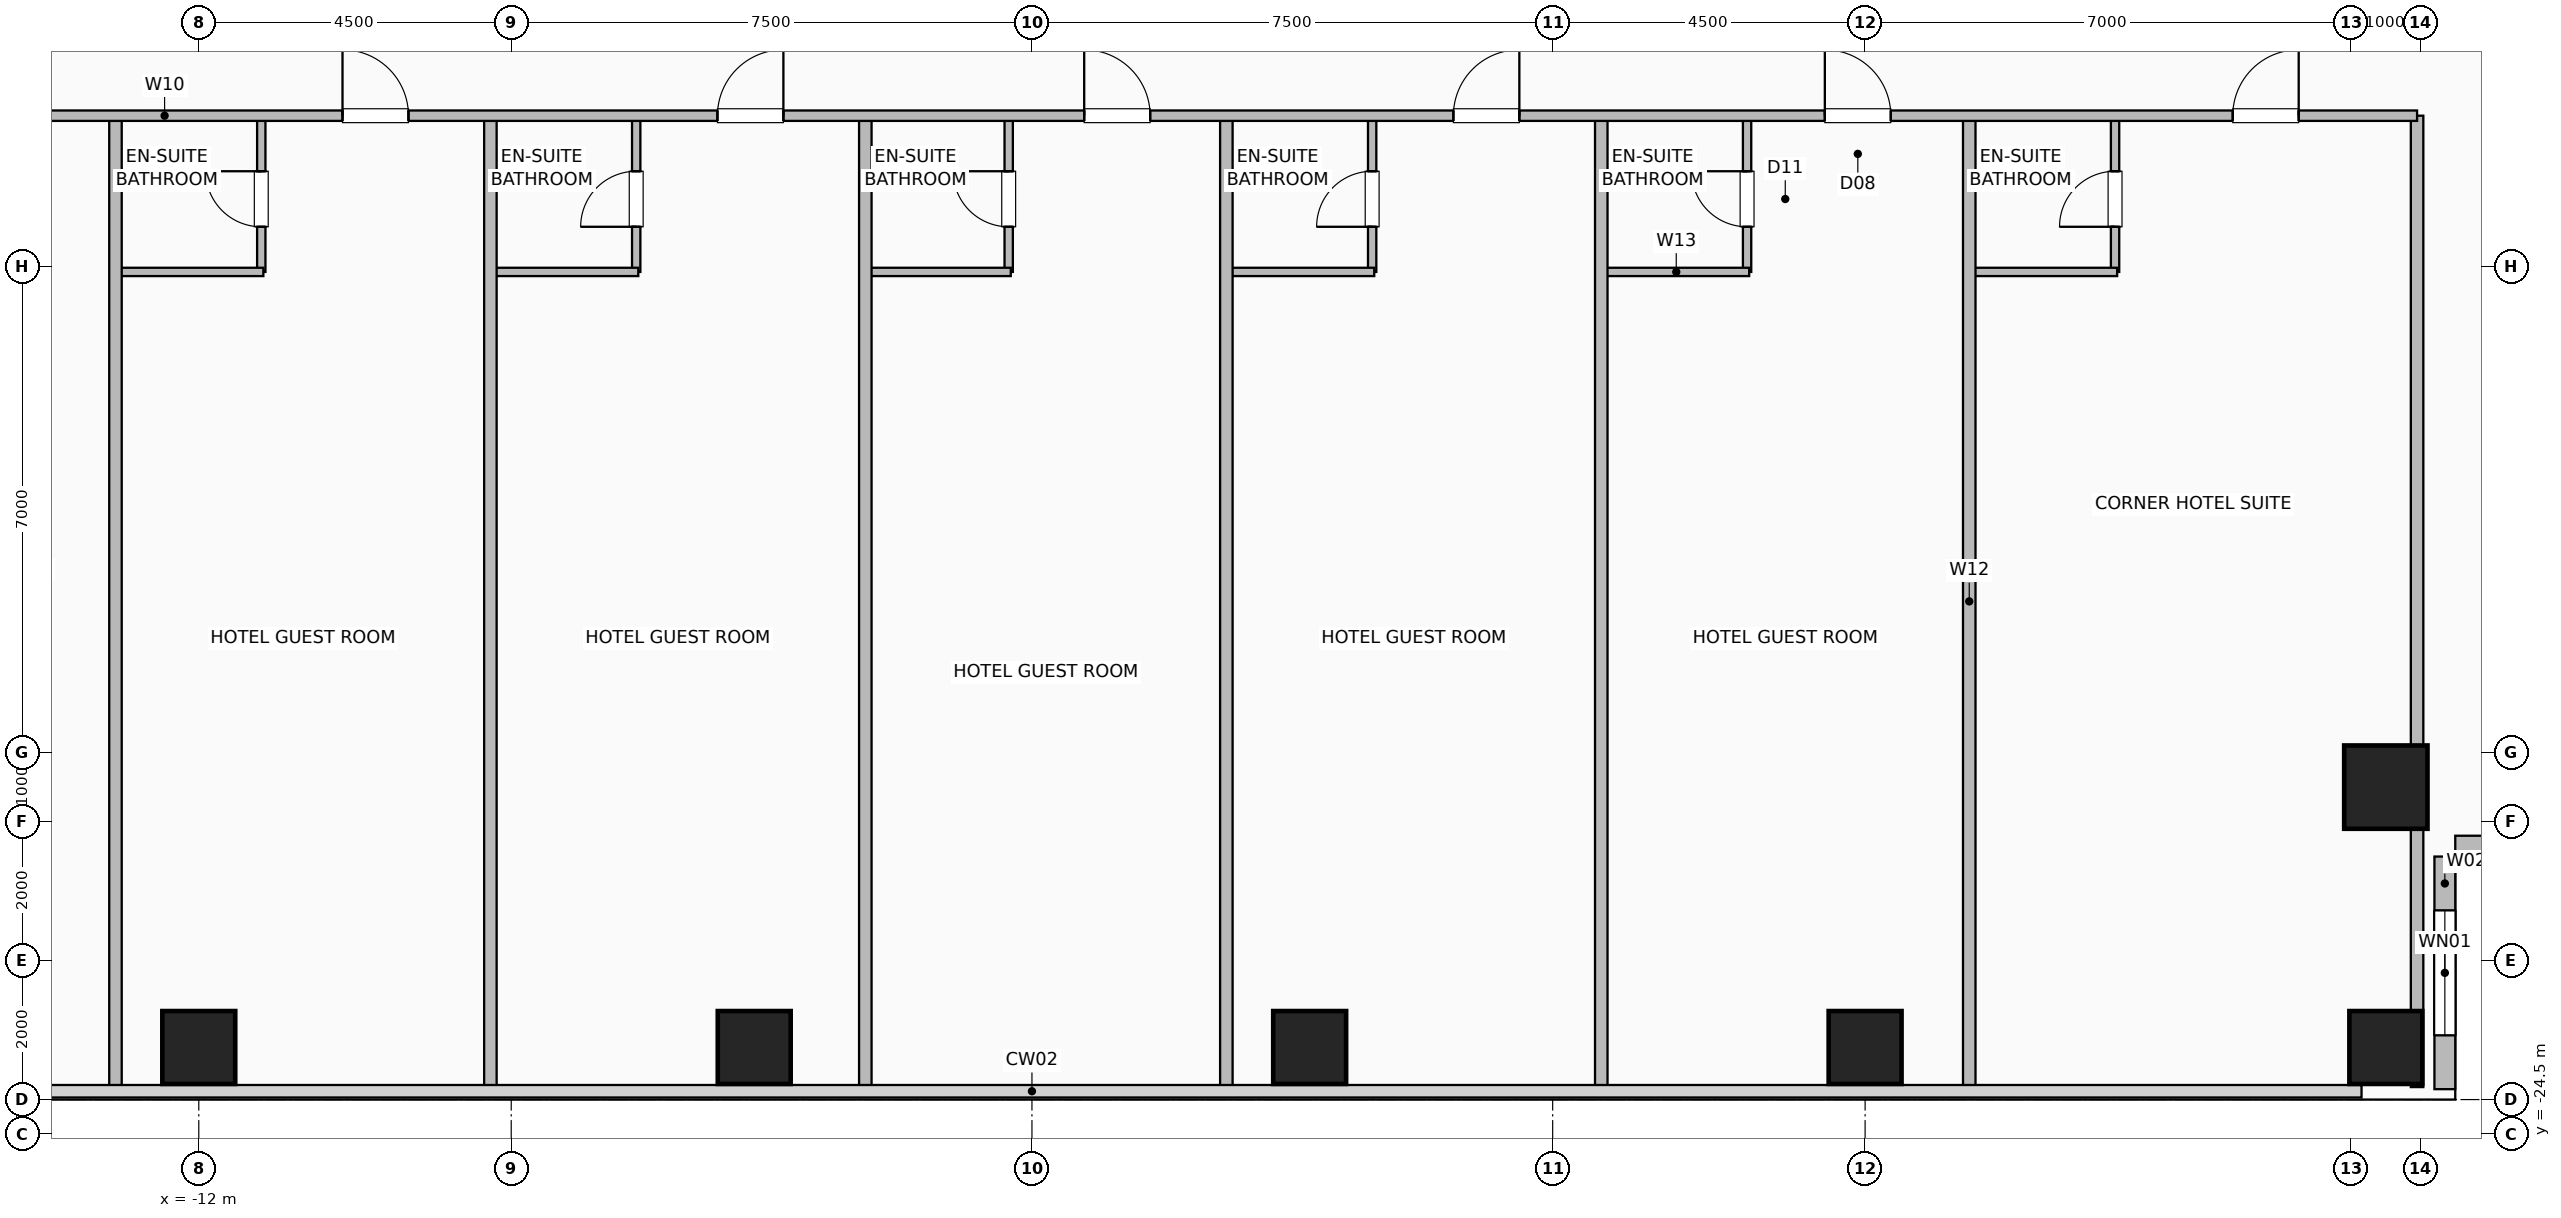
"""IFC4 building model, lengths in metres.
Left out: names, types, materials, properties, quantities, classifications, styles, units other than length and angle.
Written with IfcOpenShell. Run it as: python <this file> out.ifc"""

import sys

from ifc_helpers import new_model, si_unit, direction, frame, frame_2d, origin, origin_2d, place, context, subcontext, project, spatial, rectangle, hollow_rectangle, extrude, element, fill, save


model = new_model("IFC4")
c1 = context("Model", 3, precision=1e-05, world=origin(), true_north=direction((0.0, 1.0)))
c2 = subcontext(c1, "Body", "Model", "MODEL_VIEW")
j1 = project(units=[si_unit("LENGTHUNIT", "METRE"), si_unit("PLANEANGLEUNIT", "RADIAN")], contexts=[c1])
p1 = place(None, origin())
s1 = spatial("IfcSite", under=j1, at=p1, CompositionType="ELEMENT")
p2 = place(p1, origin())
s2 = spatial("IfcBuilding", under=s1, at=p2, CompositionType="ELEMENT")
p3 = place(p2, frame((0.0, 0.0, 30.5)))
s3 = spatial("IfcBuildingStorey", under=s2, at=p3, CompositionType="ELEMENT", Elevation=30.5)
for number, where, z_axis, x_axis in (
    (1, (-12.0, -23.25, 0.0), (0.0, 0.0, 1.0), (1.0, 0.0, 0.0)),
    (2, (-4.0, -23.25, 0.0), (0.0, 0.0, 1.0), (1.0, 0.0, 0.0)),
    (3, (4.0, -23.25, 0.0), (0.0, 0.0, 1.0), (1.0, 0.0, 0.0)),
    (4, (12.0, -23.25, 0.0), (0.0, 0.0, 1.0), (1.0, 0.0, 0.0)),
    (5, (19.5, -23.25, 0.0), (0.0, 0.0, 1.0), (1.0, 0.0, 0.0)),
):
    element("IfcColumn", number, at=place(p3, frame(where, z_axis=z_axis, x_axis=x_axis)), inside=s3, PredefinedType="COLUMN", context=c2, shape_type="SweptSolid", body=[
        extrude(hollow_rectangle(XDim=1.05, YDim=1.05, WallThickness=0.05, at=origin_2d()), origin(), (0.0, 0.0, 1.0), 3.5),
    ])
p4 = place(p3, frame((19.5, -19.5, 0.0), z_axis=(0.0, 0.0, 1.0), x_axis=(1.0, 0.0, 0.0)))
e6 = element("IfcColumn", 6, at=p4, inside=s3, PredefinedType="COLUMN", context=c2, shape_type="SweptSolid", body=[
    extrude(hollow_rectangle(XDim=1.2, YDim=1.2, WallThickness=0.055, at=origin_2d()), origin(), (0.0, 0.0, 1.0), 3.5),
])
p5 = place(p3, frame((20.35, -23.85, 0.0), z_axis=(0.0, 0.0, 1.0), x_axis=(0.0, 1.0, 0.0)))
e7 = element("IfcWall", 7, at=p5, inside=s3, PredefinedType="SOLIDWALL", context=c2, shape_type="SweptSolid", body=[
    extrude(rectangle(XDim=3.35, YDim=0.3, at=frame_2d((1.675, 0.0))), origin(), (0.0, 0.0, 1.0), 3.25),
])
p6 = place(p5, frame((0.775, 0.0, 0.9)))
e8 = element("IfcOpeningElement", 8, at=p6, cuts=e7, PredefinedType="OPENING", context=c2, shape_type="SweptSolid", body=[
    extrude(rectangle(XDim=1.8, YDim=1.8, at=frame_2d((0.9, 0.9))), frame((0.0, 0.16, 0.0), z_axis=(0.0, -1.0, 0.0), x_axis=(1.0, 0.0, 0.0)), (0.0, 0.0, 1.0), 0.32),
])
p7 = place(p3, frame((23.85, -20.35, 0.0), z_axis=(0.0, 0.0, 1.0), x_axis=(-1.0, 0.0, 0.0)))
e9 = element("IfcWall", 9, at=p7, inside=s3, PredefinedType="SOLIDWALL", context=c2, shape_type="SweptSolid", body=[
    extrude(rectangle(XDim=3.35, YDim=0.3, at=frame_2d((1.675, 0.0))), origin(), (0.0, 0.0, 1.0), 3.25),
])
p8 = place(p3, frame((-11.1, -12.08, 0.0), z_axis=(0.0, 0.0, 1.0), x_axis=(0.0, 1.0, 0.0)))
e10 = element("IfcWall", 10, at=p8, inside=s3, PredefinedType="PLUMBINGWALL", context=c2, shape_type="SweptSolid", body=[
    extrude(rectangle(XDim=2.25, YDim=0.12, at=frame_2d((1.125, 0.0))), origin(), (0.0, 0.0, 1.0), 3.25),
])
p9 = place(p8, frame((0.65, 0.0, 0.0)))
e11 = element("IfcOpeningElement", 11, at=p9, cuts=e10, PredefinedType="OPENING", context=c2, shape_type="SweptSolid", body=[
    extrude(rectangle(XDim=0.8, YDim=2.05, at=frame_2d((0.4, 1.025))), frame((0.0, 0.07, 0.0), z_axis=(0.0, -1.0, 0.0), x_axis=(1.0, 0.0, 0.0)), (0.0, 0.0, 1.0), 0.14),
])
p10 = place(p3, frame((-13.17, -12.08, 0.0), z_axis=(0.0, 0.0, 1.0), x_axis=(1.0, 0.0, 0.0)))
e12 = element("IfcWall", 12, at=p10, inside=s3, PredefinedType="PLUMBINGWALL", context=c2, shape_type="SweptSolid", body=[
    extrude(rectangle(XDim=2.1, YDim=0.12, at=frame_2d((1.05, 0.0))), origin(), (0.0, 0.0, 1.0), 3.25),
])
p11 = place(p3, frame((-5.7, -12.08, 0.0), z_axis=(0.0, 0.0, 1.0), x_axis=(0.0, 1.0, 0.0)))
e13 = element("IfcWall", 13, at=p11, inside=s3, PredefinedType="PLUMBINGWALL", context=c2, shape_type="SweptSolid", body=[
    extrude(rectangle(XDim=2.25, YDim=0.12, at=frame_2d((1.125, 0.0))), origin(), (0.0, 0.0, 1.0), 3.25),
])
p12 = place(p11, frame((0.65, 0.0, 0.0)))
e14 = element("IfcOpeningElement", 14, at=p12, cuts=e13, PredefinedType="OPENING", context=c2, shape_type="SweptSolid", body=[
    extrude(rectangle(XDim=0.8, YDim=2.05, at=frame_2d((0.4, 1.025))), frame((0.0, 0.07, 0.0), z_axis=(0.0, -1.0, 0.0), x_axis=(1.0, 0.0, 0.0)), (0.0, 0.0, 1.0), 0.14),
])
p13 = place(p3, frame((-7.77, -12.08, 0.0), z_axis=(0.0, 0.0, 1.0), x_axis=(1.0, 0.0, 0.0)))
e15 = element("IfcWall", 15, at=p13, inside=s3, PredefinedType="PLUMBINGWALL", context=c2, shape_type="SweptSolid", body=[
    extrude(rectangle(XDim=2.1, YDim=0.12, at=frame_2d((1.05, 0.0))), origin(), (0.0, 0.0, 1.0), 3.25),
])
p14 = place(p3, frame((-0.335, -12.08, 0.0), z_axis=(0.0, 0.0, 1.0), x_axis=(0.0, 1.0, 0.0)))
e16 = element("IfcWall", 16, at=p14, inside=s3, PredefinedType="PLUMBINGWALL", context=c2, shape_type="SweptSolid", body=[
    extrude(rectangle(XDim=2.25, YDim=0.12, at=frame_2d((1.125, 0.0))), origin(), (0.0, 0.0, 1.0), 3.25),
])
p15 = place(p14, frame((0.65, 0.0, 0.0)))
e17 = element("IfcOpeningElement", 17, at=p15, cuts=e16, PredefinedType="OPENING", context=c2, shape_type="SweptSolid", body=[
    extrude(rectangle(XDim=0.8, YDim=2.05, at=frame_2d((0.4, 1.025))), frame((0.0, 0.07, 0.0), z_axis=(0.0, -1.0, 0.0), x_axis=(1.0, 0.0, 0.0)), (0.0, 0.0, 1.0), 0.14),
])
p16 = place(p3, frame((-2.37, -12.08, 0.0), z_axis=(0.0, 0.0, 1.0), x_axis=(1.0, 0.0, 0.0)))
e18 = element("IfcWall", 18, at=p16, inside=s3, PredefinedType="PLUMBINGWALL", context=c2, shape_type="SweptSolid", body=[
    extrude(rectangle(XDim=2.065, YDim=0.12, at=frame_2d((1.033, 0.0))), origin(), (0.0, 0.0, 1.0), 3.25),
])
p17 = place(p3, frame((4.9, -12.08, 0.0), z_axis=(0.0, 0.0, 1.0), x_axis=(0.0, 1.0, 0.0)))
e19 = element("IfcWall", 19, at=p17, inside=s3, PredefinedType="PLUMBINGWALL", context=c2, shape_type="SweptSolid", body=[
    extrude(rectangle(XDim=2.25, YDim=0.12, at=frame_2d((1.125, 0.0))), origin(), (0.0, 0.0, 1.0), 3.25),
])
p18 = place(p17, frame((0.65, 0.0, 0.0)))
e20 = element("IfcOpeningElement", 20, at=p18, cuts=e19, PredefinedType="OPENING", context=c2, shape_type="SweptSolid", body=[
    extrude(rectangle(XDim=0.8, YDim=2.05, at=frame_2d((0.4, 1.025))), frame((0.0, 0.07, 0.0), z_axis=(0.0, -1.0, 0.0), x_axis=(1.0, 0.0, 0.0)), (0.0, 0.0, 1.0), 0.14),
])
p19 = place(p3, frame((2.83, -12.08, 0.0), z_axis=(0.0, 0.0, 1.0), x_axis=(1.0, 0.0, 0.0)))
e21 = element("IfcWall", 21, at=p19, inside=s3, PredefinedType="PLUMBINGWALL", context=c2, shape_type="SweptSolid", body=[
    extrude(rectangle(XDim=2.1, YDim=0.12, at=frame_2d((1.05, 0.0))), origin(), (0.0, 0.0, 1.0), 3.25),
])
p20 = place(p3, frame((10.3, -12.08, 0.0), z_axis=(0.0, 0.0, 1.0), x_axis=(0.0, 1.0, 0.0)))
e22 = element("IfcWall", 22, at=p20, inside=s3, PredefinedType="PLUMBINGWALL", context=c2, shape_type="SweptSolid", body=[
    extrude(rectangle(XDim=2.25, YDim=0.12, at=frame_2d((1.125, 0.0))), origin(), (0.0, 0.0, 1.0), 3.25),
])
p21 = place(p20, frame((0.65, 0.0, 0.0)))
e23 = element("IfcOpeningElement", 23, at=p21, cuts=e22, PredefinedType="OPENING", context=c2, shape_type="SweptSolid", body=[
    extrude(rectangle(XDim=0.8, YDim=2.05, at=frame_2d((0.4, 1.025))), frame((0.0, 0.07, 0.0), z_axis=(0.0, -1.0, 0.0), x_axis=(1.0, 0.0, 0.0)), (0.0, 0.0, 1.0), 0.14),
])
p22 = place(p3, frame((8.23, -12.08, 0.0), z_axis=(0.0, 0.0, 1.0), x_axis=(1.0, 0.0, 0.0)))
e24 = element("IfcWall", 24, at=p22, inside=s3, PredefinedType="PLUMBINGWALL", context=c2, shape_type="SweptSolid", body=[
    extrude(rectangle(XDim=2.1, YDim=0.12, at=frame_2d((1.05, 0.0))), origin(), (0.0, 0.0, 1.0), 3.25),
])
p23 = place(p3, frame((15.6, -12.08, 0.0), z_axis=(0.0, 0.0, 1.0), x_axis=(0.0, 1.0, 0.0)))
e25 = element("IfcWall", 25, at=p23, inside=s3, PredefinedType="PLUMBINGWALL", context=c2, shape_type="SweptSolid", body=[
    extrude(rectangle(XDim=2.25, YDim=0.12, at=frame_2d((1.125, 0.0))), origin(), (0.0, 0.0, 1.0), 3.25),
])
p24 = place(p23, frame((0.65, 0.0, 0.0)))
e26 = element("IfcOpeningElement", 26, at=p24, cuts=e25, PredefinedType="OPENING", context=c2, shape_type="SweptSolid", body=[
    extrude(rectangle(XDim=0.8, YDim=2.05, at=frame_2d((0.4, 1.025))), frame((0.0, 0.07, 0.0), z_axis=(0.0, -1.0, 0.0), x_axis=(1.0, 0.0, 0.0)), (0.0, 0.0, 1.0), 0.14),
])
p25 = place(p3, frame((13.53, -12.08, 0.0), z_axis=(0.0, 0.0, 1.0), x_axis=(1.0, 0.0, 0.0)))
e27 = element("IfcWall", 27, at=p25, inside=s3, PredefinedType="PLUMBINGWALL", context=c2, shape_type="SweptSolid", body=[
    extrude(rectangle(XDim=2.1, YDim=0.12, at=frame_2d((1.05, 0.0))), origin(), (0.0, 0.0, 1.0), 3.25),
])
for number, where, z_axis, x_axis in (
    (28, (-13.2, -23.82, 0.0), (0.0, 0.0, 1.0), (0.0, 1.0, 0.0)),
    (29, (-7.8, -23.82, 0.0), (0.0, 0.0, 1.0), (0.0, 1.0, 0.0)),
    (30, (-2.4, -23.82, 0.0), (0.0, 0.0, 1.0), (0.0, 1.0, 0.0)),
    (31, (2.8, -23.82, 0.0), (0.0, 0.0, 1.0), (0.0, 1.0, 0.0)),
    (32, (8.2, -23.82, 0.0), (0.0, 0.0, 1.0), (0.0, 1.0, 0.0)),
    (33, (13.5, -23.82, 0.0), (0.0, 0.0, 1.0), (0.0, 1.0, 0.0)),
    (34, (19.95, -23.82, 0.0), (0.0, 0.0, 1.0), (0.0, 1.0, 0.0)),
):
    element("IfcWall", number, at=place(p3, frame(where, z_axis=z_axis, x_axis=x_axis)), inside=s3, PredefinedType="PARTITIONING", context=c2, shape_type="SweptSolid", body=[
        extrude(rectangle(XDim=13.99, YDim=0.18, at=frame_2d((6.995, 0.0))), origin(), (0.0, 0.0, 1.0), 3.25),
    ])
p26 = place(p3, frame((-19.95, -9.83, 0.0), z_axis=(0.0, 0.0, 1.0), x_axis=(1.0, 0.0, 0.0)))
e35 = element("IfcWall", 35, at=p26, inside=s3, PredefinedType="PARTITIONING", context=c2, shape_type="SweptSolid", body=[
    extrude(rectangle(XDim=39.9, YDim=0.15, at=frame_2d((19.95, 0.0))), origin(), (0.0, 0.0, 1.0), 3.25),
])
p27 = place(p26, frame((3.945, 0.0, 0.0)))
e36 = element("IfcOpeningElement", 36, at=p27, cuts=e35, PredefinedType="OPENING", context=c2, shape_type="SweptSolid", body=[
    extrude(rectangle(XDim=0.95, YDim=2.08, at=frame_2d((0.475, 1.04))), frame((0.0, 0.085, 0.0), z_axis=(0.0, -1.0, 0.0), x_axis=(1.0, 0.0, 0.0)), (0.0, 0.0, 1.0), 0.17),
])
p28 = place(p26, frame((10.02, 0.0, 0.0)))
e37 = element("IfcOpeningElement", 37, at=p28, cuts=e35, PredefinedType="OPENING", context=c2, shape_type="SweptSolid", body=[
    extrude(rectangle(XDim=0.95, YDim=2.08, at=frame_2d((0.475, 1.04))), frame((0.0, 0.085, 0.0), z_axis=(0.0, -1.0, 0.0), x_axis=(1.0, 0.0, 0.0)), (0.0, 0.0, 1.0), 0.17),
])
p29 = place(p26, frame((15.42, 0.0, 0.0)))
e38 = element("IfcOpeningElement", 38, at=p29, cuts=e35, PredefinedType="OPENING", context=c2, shape_type="SweptSolid", body=[
    extrude(rectangle(XDim=0.95, YDim=2.08, at=frame_2d((0.475, 1.04))), frame((0.0, 0.085, 0.0), z_axis=(0.0, -1.0, 0.0), x_axis=(1.0, 0.0, 0.0)), (0.0, 0.0, 1.0), 0.17),
])
p30 = place(p26, frame((20.702, 0.0, 0.0)))
e39 = element("IfcOpeningElement", 39, at=p30, cuts=e35, PredefinedType="OPENING", context=c2, shape_type="SweptSolid", body=[
    extrude(rectangle(XDim=0.95, YDim=2.08, at=frame_2d((0.475, 1.04))), frame((0.0, 0.085, 0.0), z_axis=(0.0, -1.0, 0.0), x_axis=(1.0, 0.0, 0.0)), (0.0, 0.0, 1.0), 0.17),
])
p31 = place(p26, frame((26.02, 0.0, 0.0)))
e40 = element("IfcOpeningElement", 40, at=p31, cuts=e35, PredefinedType="OPENING", context=c2, shape_type="SweptSolid", body=[
    extrude(rectangle(XDim=0.95, YDim=2.08, at=frame_2d((0.475, 1.04))), frame((0.0, 0.085, 0.0), z_axis=(0.0, -1.0, 0.0), x_axis=(1.0, 0.0, 0.0)), (0.0, 0.0, 1.0), 0.17),
])
p32 = place(p26, frame((31.37, 0.0, 0.0)))
e41 = element("IfcOpeningElement", 41, at=p32, cuts=e35, PredefinedType="OPENING", context=c2, shape_type="SweptSolid", body=[
    extrude(rectangle(XDim=0.95, YDim=2.08, at=frame_2d((0.475, 1.04))), frame((0.0, 0.085, 0.0), z_axis=(0.0, -1.0, 0.0), x_axis=(1.0, 0.0, 0.0)), (0.0, 0.0, 1.0), 0.17),
])
p33 = place(p26, frame((37.245, 0.0, 0.0)))
e42 = element("IfcOpeningElement", 42, at=p33, cuts=e35, PredefinedType="OPENING", context=c2, shape_type="SweptSolid", body=[
    extrude(rectangle(XDim=0.95, YDim=2.08, at=frame_2d((0.475, 1.04))), frame((0.0, 0.085, 0.0), z_axis=(0.0, -1.0, 0.0), x_axis=(1.0, 0.0, 0.0)), (0.0, 0.0, 1.0), 0.17),
])
p34 = place(p6, origin())
e43 = element("IfcWindow", 43, at=p34, inside=s3, PartitioningType="SINGLE_PANEL", PredefinedType="WINDOW", context=c2, shape_type="SweptSolid", body=[
    extrude(rectangle(XDim=1.8, YDim=1.8, at=frame_2d((0.9, 0.9))), frame((0.0, 0.03, 0.0), z_axis=(0.0, -1.0, 0.0), x_axis=(1.0, 0.0, 0.0)), (0.0, 0.0, 1.0), 0.06),
])
fill(e8, e43)
p35 = place(p9, origin())
e44 = element("IfcDoor", 44, at=p35, inside=s3, OperationType="SINGLE_SWING_RIGHT", PredefinedType="DOOR", context=c2, shape_type="SweptSolid", body=[
    extrude(rectangle(XDim=0.8, YDim=2.05, at=frame_2d((0.4, 1.025))), frame((0.0, 0.025, 0.0), z_axis=(0.0, -1.0, 0.0), x_axis=(1.0, 0.0, 0.0)), (0.0, 0.0, 1.0), 0.05),
])
fill(e11, e44)
p36 = place(p12, origin())
e45 = element("IfcDoor", 45, at=p36, inside=s3, OperationType="SINGLE_SWING_LEFT", PredefinedType="DOOR", context=c2, shape_type="SweptSolid", body=[
    extrude(rectangle(XDim=0.8, YDim=2.05, at=frame_2d((0.4, 1.025))), frame((0.0, 0.025, 0.0), z_axis=(0.0, -1.0, 0.0), x_axis=(1.0, 0.0, 0.0)), (0.0, 0.0, 1.0), 0.05),
])
fill(e14, e45)
p37 = place(p15, origin())
e46 = element("IfcDoor", 46, at=p37, inside=s3, OperationType="SINGLE_SWING_RIGHT", PredefinedType="DOOR", context=c2, shape_type="SweptSolid", body=[
    extrude(rectangle(XDim=0.8, YDim=2.05, at=frame_2d((0.4, 1.025))), frame((0.0, 0.025, 0.0), z_axis=(0.0, -1.0, 0.0), x_axis=(1.0, 0.0, 0.0)), (0.0, 0.0, 1.0), 0.05),
])
fill(e17, e46)
p38 = place(p18, origin())
e47 = element("IfcDoor", 47, at=p38, inside=s3, OperationType="SINGLE_SWING_LEFT", PredefinedType="DOOR", context=c2, shape_type="SweptSolid", body=[
    extrude(rectangle(XDim=0.8, YDim=2.05, at=frame_2d((0.4, 1.025))), frame((0.0, 0.025, 0.0), z_axis=(0.0, -1.0, 0.0), x_axis=(1.0, 0.0, 0.0)), (0.0, 0.0, 1.0), 0.05),
])
fill(e20, e47)
p39 = place(p21, origin())
e48 = element("IfcDoor", 48, at=p39, inside=s3, OperationType="SINGLE_SWING_RIGHT", PredefinedType="DOOR", context=c2, shape_type="SweptSolid", body=[
    extrude(rectangle(XDim=0.8, YDim=2.05, at=frame_2d((0.4, 1.025))), frame((0.0, 0.025, 0.0), z_axis=(0.0, -1.0, 0.0), x_axis=(1.0, 0.0, 0.0)), (0.0, 0.0, 1.0), 0.05),
])
fill(e23, e48)
p40 = place(p24, origin())
e49 = element("IfcDoor", 49, at=p40, inside=s3, OperationType="SINGLE_SWING_LEFT", PredefinedType="DOOR", context=c2, shape_type="SweptSolid", body=[
    extrude(rectangle(XDim=0.8, YDim=2.05, at=frame_2d((0.4, 1.025))), frame((0.0, 0.025, 0.0), z_axis=(0.0, -1.0, 0.0), x_axis=(1.0, 0.0, 0.0)), (0.0, 0.0, 1.0), 0.05),
])
fill(e26, e49)
p41 = place(p28, origin())
e50 = element("IfcDoor", 50, at=p41, inside=s3, OperationType="SINGLE_SWING_LEFT", PredefinedType="DOOR", context=c2, shape_type="SweptSolid", body=[
    extrude(rectangle(XDim=0.95, YDim=2.08, at=frame_2d((0.475, 1.04))), frame((0.0, 0.025, 0.0), z_axis=(0.0, -1.0, 0.0), x_axis=(1.0, 0.0, 0.0)), (0.0, 0.0, 1.0), 0.05),
])
fill(e37, e50)
p42 = place(p29, origin())
e51 = element("IfcDoor", 51, at=p42, inside=s3, OperationType="SINGLE_SWING_RIGHT", PredefinedType="DOOR", context=c2, shape_type="SweptSolid", body=[
    extrude(rectangle(XDim=0.95, YDim=2.08, at=frame_2d((0.475, 1.04))), frame((0.0, 0.025, 0.0), z_axis=(0.0, -1.0, 0.0), x_axis=(1.0, 0.0, 0.0)), (0.0, 0.0, 1.0), 0.05),
])
fill(e38, e51)
p43 = place(p30, origin())
e52 = element("IfcDoor", 52, at=p43, inside=s3, OperationType="SINGLE_SWING_LEFT", PredefinedType="DOOR", context=c2, shape_type="SweptSolid", body=[
    extrude(rectangle(XDim=0.95, YDim=2.08, at=frame_2d((0.475, 1.04))), frame((0.0, 0.025, 0.0), z_axis=(0.0, -1.0, 0.0), x_axis=(1.0, 0.0, 0.0)), (0.0, 0.0, 1.0), 0.05),
])
fill(e39, e52)
p44 = place(p31, origin())
e53 = element("IfcDoor", 53, at=p44, inside=s3, OperationType="SINGLE_SWING_RIGHT", PredefinedType="DOOR", context=c2, shape_type="SweptSolid", body=[
    extrude(rectangle(XDim=0.95, YDim=2.08, at=frame_2d((0.475, 1.04))), frame((0.0, 0.025, 0.0), z_axis=(0.0, -1.0, 0.0), x_axis=(1.0, 0.0, 0.0)), (0.0, 0.0, 1.0), 0.05),
])
fill(e40, e53)
p45 = place(p32, origin())
e54 = element("IfcDoor", 54, at=p45, inside=s3, OperationType="SINGLE_SWING_LEFT", PredefinedType="DOOR", context=c2, shape_type="SweptSolid", body=[
    extrude(rectangle(XDim=0.95, YDim=2.08, at=frame_2d((0.475, 1.04))), frame((0.0, 0.025, 0.0), z_axis=(0.0, -1.0, 0.0), x_axis=(1.0, 0.0, 0.0)), (0.0, 0.0, 1.0), 0.05),
])
fill(e41, e54)
p46 = place(p33, origin())
e55 = element("IfcDoor", 55, at=p46, inside=s3, OperationType="SINGLE_SWING_RIGHT", PredefinedType="DOOR", context=c2, shape_type="SweptSolid", body=[
    extrude(rectangle(XDim=0.95, YDim=2.08, at=frame_2d((0.475, 1.04))), frame((0.0, 0.025, 0.0), z_axis=(0.0, -1.0, 0.0), x_axis=(1.0, 0.0, 0.0)), (0.0, 0.0, 1.0), 0.05),
])
fill(e42, e55)
save(model, sys.argv[1])
